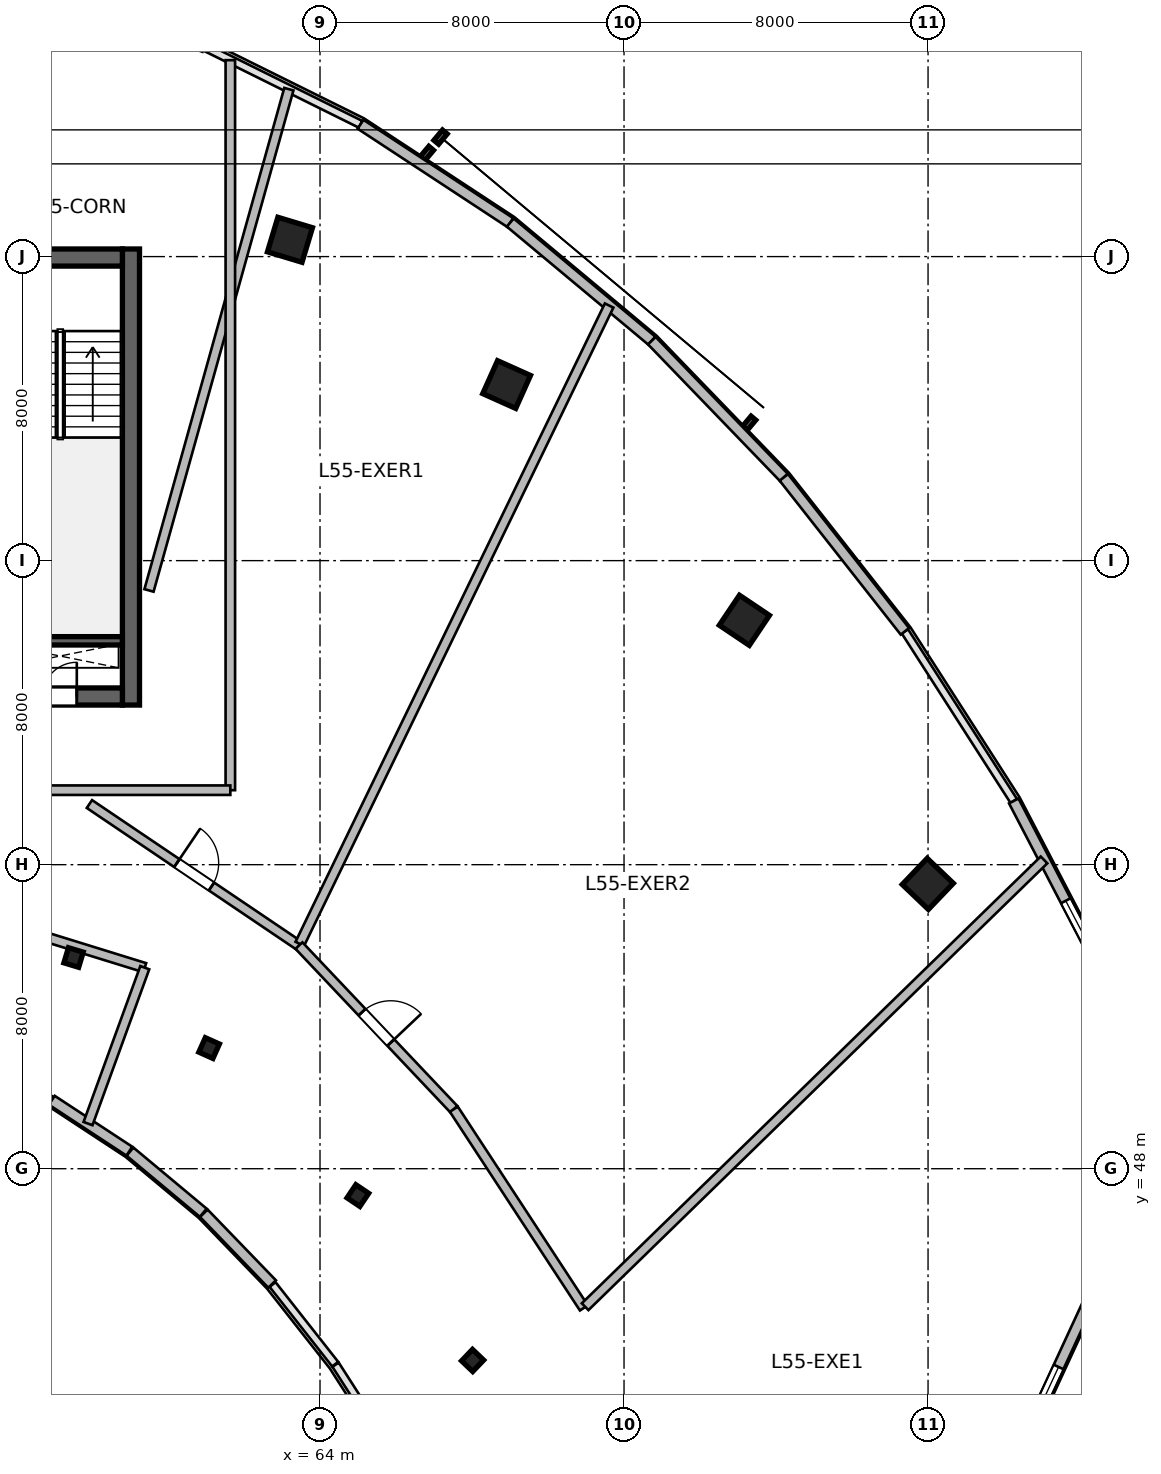
"""IFC4 building model, lengths in metres.
Left out: names, types, materials, properties, quantities, classifications, styles, units other than length and angle.
Written with IfcOpenShell. Run it as: python <this file> out.ifc"""

import sys

from ifc_helpers import new_model, si_unit, direction, frame, frame_2d, origin, origin_2d, place, context, subcontext, project, spatial, rectangle, i_section, extrude, source, transform, mapped, element, fill, save


model = new_model("IFC4")
c1 = context("Model", 3, precision=1e-05, world=origin(), true_north=direction((0.0, 1.0)))
c2 = subcontext(c1, "Body", "Model", "MODEL_VIEW")
j1 = project(units=[si_unit("LENGTHUNIT", "METRE"), si_unit("PLANEANGLEUNIT", "RADIAN")], contexts=[c1])
p1 = place(None, origin())
s1 = spatial("IfcSite", under=j1, at=p1, CompositionType="ELEMENT")
p2 = place(p1, origin())
s2 = spatial("IfcBuilding", under=s1, at=p2, CompositionType="ELEMENT")
p3 = place(p2, frame((0.0, 0.0, 227.4)))
s3 = spatial("IfcBuildingStorey", under=s2, at=p3, CompositionType="ELEMENT", Elevation=227.4)
m1 = source(origin(), c2, "Body", "SweptSolid", [
    extrude(rectangle(XDim=12.0, YDim=0.45, at=frame_2d((6.0, 0.0))), origin(), (0.0, 0.0, 1.0), 3.9),
])
p4 = place(p3, frame((59.025, 60.2, 0.0), z_axis=(0.0, 0.0, 1.0), x_axis=(0.0, 1.0, 0.0)))
e1 = element("IfcWall", 1, at=p4, inside=s3, PredefinedType="SHEAR", context=c2, shape_type="MappedRepresentation", body=[
    mapped(m1, transform((0.0, 0.0, 0.0), scale=1.0)),
])
m2 = source(origin(), c2, "Body", "SweptSolid", [
    extrude(rectangle(XDim=21.6, YDim=0.45, at=frame_2d((10.8, 0.0))), origin(), (0.0, 0.0, 1.0), 3.9),
])
p5 = place(p3, frame((37.2, 60.425, 0.0), z_axis=(0.0, 0.0, 1.0), x_axis=(1.0, 0.0, 0.0)))
e2 = element("IfcWall", 2, at=p5, inside=s3, PredefinedType="SHEAR", context=c2, shape_type="MappedRepresentation", body=[
    mapped(m2, transform((0.0, 0.0, 0.0), scale=1.0)),
])
p6 = place(p5, frame((1.1, 0.0, 0.0)))
e3 = element("IfcOpeningElement", 3, at=p6, cuts=e2, PredefinedType="OPENING", context=c2, shape_type="SweptSolid", body=[
    extrude(rectangle(XDim=1.15, YDim=2.15, at=frame_2d((0.575, 1.075))), frame((0.0, 0.235, 0.0), z_axis=(0.0, -1.0, 0.0), x_axis=(1.0, 0.0, 0.0)), (0.0, 0.0, 1.0), 0.47),
])
p7 = place(p5, frame((19.5, 0.0, 0.0)))
e4 = element("IfcOpeningElement", 4, at=p7, cuts=e2, PredefinedType="OPENING", context=c2, shape_type="SweptSolid", body=[
    extrude(rectangle(XDim=0.9, YDim=2.1, at=frame_2d((0.45, 1.05))), frame((0.0, 0.235, 0.0), z_axis=(0.0, -1.0, 0.0), x_axis=(1.0, 0.0, 0.0)), (0.0, 0.0, 1.0), 0.47),
])
p8 = place(p5, frame((12.02, 0.0, 0.0)))
e5 = element("IfcOpeningElement", 5, at=p8, cuts=e2, PredefinedType="OPENING", context=c2, shape_type="SweptSolid", body=[
    extrude(rectangle(XDim=1.6, YDim=2.15, at=frame_2d((0.8, 1.075))), frame((0.0, 0.235, 0.0), z_axis=(0.0, -1.0, 0.0), x_axis=(1.0, 0.0, 0.0)), (0.0, 0.0, 1.0), 0.47),
])
p9 = place(p3, frame((37.2, 71.975, 0.0), z_axis=(0.0, 0.0, 1.0), x_axis=(1.0, 0.0, 0.0)))
e6 = element("IfcWall", 6, at=p9, inside=s3, PredefinedType="SHEAR", context=c2, shape_type="MappedRepresentation", body=[
    mapped(m2, transform((0.0, 0.0, 0.0), scale=1.0)),
])
p10 = place(p9, frame((1.2, 0.0, 0.0)))
e7 = element("IfcOpeningElement", 7, at=p10, cuts=e6, PredefinedType="OPENING", context=c2, shape_type="SweptSolid", body=[
    extrude(rectangle(XDim=0.9, YDim=2.1, at=frame_2d((0.45, 1.05))), frame((0.0, 0.235, 0.0), z_axis=(0.0, -1.0, 0.0), x_axis=(1.0, 0.0, 0.0)), (0.0, 0.0, 1.0), 0.47),
])
p11 = place(p9, frame((14.7, 0.0, 0.0)))
e8 = element("IfcOpeningElement", 8, at=p11, cuts=e6, PredefinedType="OPENING", context=c2, shape_type="SweptSolid", body=[
    extrude(rectangle(XDim=1.2, YDim=2.15, at=frame_2d((0.6, 1.075))), frame((0.0, 0.235, 0.0), z_axis=(0.0, -1.0, 0.0), x_axis=(1.0, 0.0, 0.0)), (0.0, 0.0, 1.0), 0.47),
])
p12 = place(p9, frame((4.15, 0.0, 0.0)))
e9 = element("IfcOpeningElement", 9, at=p12, cuts=e6, PredefinedType="OPENING", context=c2, shape_type="SweptSolid", body=[
    extrude(rectangle(XDim=1.3, YDim=2.15, at=frame_2d((0.65, 1.075))), frame((0.0, 0.235, 0.0), z_axis=(0.0, -1.0, 0.0), x_axis=(1.0, 0.0, 0.0)), (0.0, 0.0, 1.0), 0.47),
])
p13 = place(p9, frame((7.1, 0.0, 0.0)))
e10 = element("IfcOpeningElement", 10, at=p13, cuts=e6, PredefinedType="OPENING", context=c2, shape_type="SweptSolid", body=[
    extrude(rectangle(XDim=0.9, YDim=2.1, at=frame_2d((0.45, 1.05))), frame((0.0, 0.235, 0.0), z_axis=(0.0, -1.0, 0.0), x_axis=(1.0, 0.0, 0.0)), (0.0, 0.0, 1.0), 0.47),
])
m3 = source(origin(), c2, "Body", "SweptSolid", [
    extrude(rectangle(XDim=3.27, YDim=0.22, at=frame_2d((1.635, 0.0))), origin(), (0.0, 0.0, 1.0), 3.9),
])
p14 = place(p3, frame((55.53, 61.89, 0.0), z_axis=(0.0, 0.0, 1.0), x_axis=(1.0, 0.0, 0.0)))
e11 = element("IfcWall", 11, at=p14, inside=s3, PredefinedType="SHEAR", context=c2, shape_type="MappedRepresentation", body=[
    mapped(m3, transform((0.0, 0.0, 0.0), scale=1.0)),
])
m4 = source(origin(), c2, "Body", "SweptSolid", [
    extrude(i_section(OverallWidth=0.406, OverallDepth=0.416, WebThickness=0.03, FlangeThickness=0.048, at=origin_2d()), origin(), (0.0, 0.0, 1.0), 3.9),
])
p15 = place(p3, frame((57.515, 53.558, 0.0), z_axis=(0.0, 0.0, 1.0), x_axis=(0.288697611798, 0.957420330337, 0.0)))
e12 = element("IfcColumn", 12, at=p15, inside=s3, PredefinedType="COLUMN", context=c2, shape_type="MappedRepresentation", body=[
    mapped(m4, transform((0.0, 0.0, 0.0), scale=1.0)),
])
m5 = source(origin(), c2, "Body", "SweptSolid", [
    extrude(rectangle(XDim=0.95, YDim=0.95, at=origin_2d()), origin(), (0.0, 0.0, 1.0), 3.9),
])
p16 = place(p3, frame((63.209, 72.442, 0.0), z_axis=(0.0, 0.0, 1.0), x_axis=(0.288697611798, 0.957420330337, 0.0)))
e13 = element("IfcColumn", 13, at=p16, inside=s3, PredefinedType="COLUMN", context=c2, shape_type="MappedRepresentation", body=[
    mapped(m5, transform((0.0, 0.0, 0.0), scale=1.0)),
])
p17 = place(p3, frame((61.082, 51.175, 0.0), z_axis=(0.0, 0.0, 1.0), x_axis=(0.409126902895, 0.912477494148, 0.0)))
e14 = element("IfcColumn", 14, at=p17, inside=s3, PredefinedType="COLUMN", context=c2, shape_type="MappedRepresentation", body=[
    mapped(m4, transform((0.0, 0.0, 0.0), scale=1.0)),
])
p18 = place(p3, frame((68.91, 68.633, 0.0), z_axis=(0.0, 0.0, 1.0), x_axis=(0.409126902895, 0.912477494148, 0.0)))
e15 = element("IfcColumn", 15, at=p18, inside=s3, PredefinedType="COLUMN", context=c2, shape_type="MappedRepresentation", body=[
    mapped(m5, transform((0.0, 0.0, 0.0), scale=1.0)),
])
p19 = place(p3, frame((64.996, 47.294, 0.0), z_axis=(0.0, 0.0, 1.0), x_axis=(0.55774510898, 0.830012285095, 0.0)))
e16 = element("IfcColumn", 16, at=p19, inside=s3, PredefinedType="COLUMN", context=c2, shape_type="MappedRepresentation", body=[
    mapped(m4, transform((0.0, 0.0, 0.0), scale=1.0)),
])
p20 = place(p3, frame((75.167, 62.43, 0.0), z_axis=(0.0, 0.0, 1.0), x_axis=(0.55774510898, 0.830012285095, 0.0)))
e17 = element("IfcColumn", 17, at=p20, inside=s3, PredefinedType="COLUMN", context=c2, shape_type="MappedRepresentation", body=[
    mapped(m5, transform((0.0, 0.0, 0.0), scale=1.0)),
])
p21 = place(p3, frame((68.015, 42.955, 0.0), z_axis=(0.0, 0.0, 1.0), x_axis=(0.690756218984, 0.723087716626, 0.0)))
e18 = element("IfcColumn", 18, at=p21, inside=s3, PredefinedType="COLUMN", context=c2, shape_type="MappedRepresentation", body=[
    mapped(m4, transform((0.0, 0.0, 0.0), scale=1.0)),
])
p22 = place(p3, frame((79.993, 55.494, 0.0), z_axis=(0.0, 0.0, 1.0), x_axis=(0.690756218984, 0.723087716626, 0.0)))
e19 = element("IfcColumn", 19, at=p22, inside=s3, PredefinedType="COLUMN", context=c2, shape_type="MappedRepresentation", body=[
    mapped(m5, transform((0.0, 0.0, 0.0), scale=1.0)),
])
m6 = source(origin(), c2, "Body", "SweptSolid", [
    extrude(rectangle(XDim=7.292, YDim=0.28, at=frame_2d((3.646, 0.0))), origin(), (0.0, 0.0, 1.0), 3.65),
])
p23 = place(p3, frame((85.268, 46.749, 0.0), z_axis=(0.0, 0.0, 1.0), x_axis=(-0.419642001049, -0.907689699708, 0.0)))
e20 = element("IfcWall", 20, at=p23, inside=s3, PredefinedType="SOLIDWALL", context=c2, shape_type="MappedRepresentation", body=[
    mapped(m6, transform((0.0, 0.0, 0.0), scale=1.0)),
])
p24 = place(p23, frame((4.369, 0.0, 0.95)))
e21 = element("IfcOpeningElement", 21, at=p24, cuts=e20, PredefinedType="OPENING", context=c2, shape_type="SweptSolid", body=[
    extrude(rectangle(XDim=2.2, YDim=2.1, at=frame_2d((1.1, 1.05))), frame((0.0, 0.15, 0.0), z_axis=(0.0, -1.0, 0.0), x_axis=(1.0, 0.0, 0.0)), (0.0, 0.0, 1.0), 0.3),
])
m7 = source(origin(), c2, "Body", "SweptSolid", [
    extrude(rectangle(XDim=2.588, YDim=0.28, at=frame_2d((1.294, 0.0))), origin(), (0.0, 0.0, 1.0), 3.65),
])
p25 = place(p3, frame((62.74, 44.966, 0.0), z_axis=(0.0, 0.0, 1.0), x_axis=(-0.694687114507, 0.719312041424, 0.0)))
e22 = element("IfcWall", 22, at=p25, inside=s3, PredefinedType="SOLIDWALL", context=c2, shape_type="MappedRepresentation", body=[
    mapped(m7, transform((0.0, 0.0, 0.0), scale=1.0)),
])
m8 = source(origin(), c2, "Body", "SweptSolid", [
    extrude(rectangle(XDim=2.511, YDim=0.28, at=frame_2d((1.256, 0.0))), origin(), (0.0, 0.0, 1.0), 3.65),
])
p26 = place(p3, frame((60.928, 46.841, 0.0), z_axis=(0.0, 0.0, 1.0), x_axis=(-0.767910416122, 0.640557251782, 0.0)))
e23 = element("IfcWall", 23, at=p26, inside=s3, PredefinedType="SOLIDWALL", context=c2, shape_type="MappedRepresentation", body=[
    mapped(m8, transform((0.0, 0.0, 0.0), scale=1.0)),
])
m9 = source(origin(), c2, "Body", "SweptSolid", [
    extrude(rectangle(XDim=2.44, YDim=0.28, at=frame_2d((1.22, 0.0))), origin(), (0.0, 0.0, 1.0), 3.65),
])
p27 = place(p3, frame((58.983, 48.462, 0.0), z_axis=(0.0, 0.0, 1.0), x_axis=(-0.83598480459, 0.548752591333, 0.0)))
e24 = element("IfcWall", 24, at=p27, inside=s3, PredefinedType="SOLIDWALL", context=c2, shape_type="MappedRepresentation", body=[
    mapped(m9, transform((0.0, 0.0, 0.0), scale=1.0)),
])
m10 = source(origin(), c2, "Body", "SweptSolid", [
    extrude(rectangle(XDim=4.713, YDim=0.28, at=frame_2d((2.356, 0.0))), origin(), (0.0, 0.0, 1.0), 3.65),
])
p28 = place(p3, frame((65.066, 75.482, 0.0), z_axis=(0.0, 0.0, 1.0), x_axis=(0.835974386457, -0.548768462275, 0.0)))
e25 = element("IfcWall", 25, at=p28, inside=s3, PredefinedType="SOLIDWALL", context=c2, shape_type="MappedRepresentation", body=[
    mapped(m10, transform((0.0, 0.0, 0.0), scale=1.0)),
])
m11 = source(origin(), c2, "Body", "SweptSolid", [
    extrude(rectangle(XDim=4.852, YDim=0.28, at=frame_2d((2.426, 0.0))), origin(), (0.0, 0.0, 1.0), 3.65),
])
p29 = place(p3, frame((69.006, 72.896, 0.0), z_axis=(0.0, 0.0, 1.0), x_axis=(0.767936605821, -0.640525853843, 0.0)))
e26 = element("IfcWall", 26, at=p29, inside=s3, PredefinedType="SOLIDWALL", context=c2, shape_type="MappedRepresentation", body=[
    mapped(m11, transform((0.0, 0.0, 0.0), scale=1.0)),
])
m12 = source(origin(), c2, "Body", "SweptSolid", [
    extrude(rectangle(XDim=5.001, YDim=0.28, at=frame_2d((2.5, 0.0))), origin(), (0.0, 0.0, 1.0), 3.65),
])
p30 = place(p3, frame((72.732, 69.788, 0.0), z_axis=(0.0, 0.0, 1.0), x_axis=(0.694572731818, -0.719422490762, 0.0)))
e27 = element("IfcWall", 27, at=p30, inside=s3, PredefinedType="SOLIDWALL", context=c2, shape_type="MappedRepresentation", body=[
    mapped(m12, transform((0.0, 0.0, 0.0), scale=1.0)),
])
m13 = source(origin(), c2, "Body", "SweptSolid", [
    extrude(rectangle(XDim=5.153, YDim=0.28, at=frame_2d((2.577, 0.0))), origin(), (0.0, 0.0, 1.0), 3.65),
])
p31 = place(p3, frame((76.205, 66.19, 0.0), z_axis=(0.0, 0.0, 1.0), x_axis=(0.618179283891, -0.786037132054, 0.0)))
e28 = element("IfcWall", 28, at=p31, inside=s3, PredefinedType="SOLIDWALL", context=c2, shape_type="MappedRepresentation", body=[
    mapped(m13, transform((0.0, 0.0, 0.0), scale=1.0)),
])
m14 = source(origin(), c2, "Body", "SweptSolid", [
    extrude(rectangle(XDim=5.416, YDim=0.28, at=frame_2d((2.708, 0.0))), origin(), (0.0, 0.0, 1.0), 3.65),
])
p32 = place(p3, frame((82.255, 57.677, 0.0), z_axis=(0.0, 0.0, 1.0), x_axis=(0.46177852435, -0.886995261796, 0.0)))
e29 = element("IfcWall", 29, at=p32, inside=s3, PredefinedType="SOLIDWALL", context=c2, shape_type="MappedRepresentation", body=[
    mapped(m14, transform((0.0, 0.0, 0.0), scale=1.0)),
])
p33 = place(p32, frame((2.962, 0.0, 0.95)))
e30 = element("IfcOpeningElement", 30, at=p33, cuts=e29, PredefinedType="OPENING", context=c2, shape_type="SweptSolid", body=[
    extrude(rectangle(XDim=2.2, YDim=2.1, at=frame_2d((1.1, 1.05))), frame((0.0, 0.15, 0.0), z_axis=(0.0, -1.0, 0.0), x_axis=(1.0, 0.0, 0.0)), (0.0, 0.0, 1.0), 0.3),
])
m15 = source(origin(), c2, "Body", "SweptSolid", [
    extrude(rectangle(XDim=11.921, YDim=0.25, at=frame_2d((5.961, 0.0))), origin(), (0.0, 0.0, 1.0), 3.095),
])
p34 = place(p3, frame((48.0, 56.813, 0.0), z_axis=(0.0, 0.0, 1.0), x_axis=(0.955326235971, -0.295553350287, 0.0)))
e31 = element("IfcWall", 31, at=p34, inside=s3, PredefinedType="PARTITIONING", context=c2, shape_type="MappedRepresentation", body=[
    mapped(m15, transform((0.0, 0.0, 0.0), scale=1.0)),
])
p35 = place(p34, frame((5.611, 0.0, 0.0)))
e32 = element("IfcOpeningElement", 32, at=p35, cuts=e31, PredefinedType="OPENING", context=c2, shape_type="SweptSolid", body=[
    extrude(rectangle(XDim=1.1, YDim=2.15, at=frame_2d((0.55, 1.075))), frame((0.0, 0.135, 0.0), z_axis=(0.0, -1.0, 0.0), x_axis=(1.0, 0.0, 0.0)), (0.0, 0.0, 1.0), 0.27),
])
m16 = source(origin(), c2, "Body", "SweptSolid", [
    extrude(rectangle(XDim=4.366, YDim=0.25, at=frame_2d((2.183, 0.0))), origin(), (0.0, 0.0, 1.0), 3.65),
])
p36 = place(p3, frame((57.896, 49.187, 0.0), z_axis=(0.0, 0.0, 1.0), x_axis=(0.342061827486, 0.939677447945, 0.0)))
e33 = element("IfcWall", 33, at=p36, inside=s3, PredefinedType="PARTITIONING", context=c2, shape_type="MappedRepresentation", body=[
    mapped(m16, transform((0.0, 0.0, 0.0), scale=1.0)),
])
m17 = source(origin(), c2, "Body", "SweptSolid", [
    extrude(rectangle(XDim=6.654, YDim=0.25, at=frame_2d((3.327, 0.0))), origin(), (0.0, 0.0, 1.0), 3.217),
])
p37 = place(p3, frame((57.932, 57.596, 0.0), z_axis=(0.0, 0.0, 1.0), x_axis=(0.828704875625, -0.559685830726, 0.0)))
e34 = element("IfcWall", 34, at=p37, inside=s3, PredefinedType="PARTITIONING", context=c2, shape_type="MappedRepresentation", body=[
    mapped(m17, transform((0.0, 0.0, 0.0), scale=1.0)),
])
p38 = place(p37, frame((2.777, 0.0, 0.0)))
e35 = element("IfcOpeningElement", 35, at=p38, cuts=e34, PredefinedType="OPENING", context=c2, shape_type="SweptSolid", body=[
    extrude(rectangle(XDim=1.1, YDim=2.15, at=frame_2d((0.55, 1.075))), frame((0.0, 0.135, 0.0), z_axis=(0.0, -1.0, 0.0), x_axis=(1.0, 0.0, 0.0)), (0.0, 0.0, 1.0), 0.27),
])
m18 = source(origin(), c2, "Body", "SweptSolid", [
    extrude(rectangle(XDim=13.694, YDim=0.25, at=frame_2d((6.847, 0.0))), origin(), (0.0, 0.0, 1.0), 3.65),
])
p39 = place(p3, frame((59.5, 63.216, 0.0), z_axis=(0.0, 0.0, 1.0), x_axis=(0.268753576604, 0.963208967495, 0.0)))
e36 = element("IfcWall", 36, at=p39, inside=s3, PredefinedType="PARTITIONING", context=c2, shape_type="MappedRepresentation", body=[
    mapped(m18, transform((0.0, 0.0, 0.0), scale=1.0)),
])
m19 = source(origin(), c2, "Body", "SweptSolid", [
    extrude(rectangle(XDim=18.664, YDim=0.25, at=frame_2d((9.332, 0.0))), origin(), (0.0, 0.0, 1.0), 3.65),
])
p40 = place(p3, frame((63.468, 53.917, 0.0), z_axis=(0.0, 0.0, 1.0), x_axis=(0.43611848828, 0.899889251064, 0.0)))
e37 = element("IfcWall", 37, at=p40, inside=s3, PredefinedType="PARTITIONING", context=c2, shape_type="MappedRepresentation", body=[
    mapped(m19, transform((0.0, 0.0, 0.0), scale=1.0)),
])
m20 = source(origin(), c2, "Body", "SweptSolid", [
    extrude(rectangle(XDim=5.929, YDim=0.25, at=frame_2d((2.964, 0.0))), origin(), (0.0, 0.0, 1.0), 3.65),
])
p41 = place(p3, frame((63.446, 53.872, 0.0), z_axis=(0.0, 0.0, 1.0), x_axis=(0.687445334019, -0.726236127396, 0.0)))
e38 = element("IfcWall", 38, at=p41, inside=s3, PredefinedType="PARTITIONING", context=c2, shape_type="MappedRepresentation", body=[
    mapped(m20, transform((0.0, 0.0, 0.0), scale=1.0)),
])
p42 = place(p41, frame((2.414, 0.0, 0.0)))
e39 = element("IfcOpeningElement", 39, at=p42, cuts=e38, PredefinedType="OPENING", context=c2, shape_type="SweptSolid", body=[
    extrude(rectangle(XDim=1.1, YDim=2.15, at=frame_2d((0.55, 1.075))), frame((0.0, 0.135, 0.0), z_axis=(0.0, -1.0, 0.0), x_axis=(1.0, 0.0, 0.0)), (0.0, 0.0, 1.0), 0.27),
])
m21 = source(origin(), c2, "Body", "SweptSolid", [
    extrude(rectangle(XDim=6.249, YDim=0.25, at=frame_2d((3.125, 0.0))), origin(), (0.0, 0.0, 1.0), 3.217),
])
p43 = place(p3, frame((67.522, 49.566, 0.0), z_axis=(0.0, 0.0, 1.0), x_axis=(0.547611432082, -0.836732764659, 0.0)))
e40 = element("IfcWall", 40, at=p43, inside=s3, PredefinedType="PARTITIONING", context=c2, shape_type="MappedRepresentation", body=[
    mapped(m21, transform((0.0, 0.0, 0.0), scale=1.0)),
])
m22 = source(origin(), c2, "Body", "SweptSolid", [
    extrude(rectangle(XDim=16.854, YDim=0.25, at=frame_2d((8.427, 0.0))), origin(), (0.0, 0.0, 1.0), 3.65),
])
p44 = place(p3, frame((70.976, 44.369, 0.0), z_axis=(0.0, 0.0, 1.0), x_axis=(0.716517105841, 0.697569521294, 0.0)))
e41 = element("IfcWall", 41, at=p44, inside=s3, PredefinedType="PARTITIONING", context=c2, shape_type="MappedRepresentation", body=[
    mapped(m22, transform((0.0, 0.0, 0.0), scale=1.0)),
])
m23 = source(origin(), c2, "Body", "SweptSolid", [
    extrude(rectangle(XDim=19.209, YDim=0.25, at=frame_2d((9.604, 0.0))), origin(), (0.0, 0.0, 1.0), 3.65),
])
p45 = place(p3, frame((61.64, 57.96, 0.0), z_axis=(0.0, 0.0, 1.0), x_axis=(0.0, 1.0, 0.0)))
e42 = element("IfcWall", 42, at=p45, inside=s3, PredefinedType="PARTITIONING", context=c2, shape_type="MappedRepresentation", body=[
    mapped(m23, transform((0.0, 0.0, 0.0), scale=1.0)),
])
m24 = source(origin(), c2, "Body", "SweptSolid", [
    extrude(rectangle(XDim=12.39, YDim=0.25, at=frame_2d((6.195, 0.0))), origin(), (0.0, 0.0, 1.0), 3.217),
])
p46 = place(p3, frame((49.25, 57.96, 0.0), z_axis=(0.0, 0.0, 1.0), x_axis=(1.0, 0.0, 0.0)))
e43 = element("IfcWall", 43, at=p46, inside=s3, PredefinedType="PARTITIONING", context=c2, shape_type="MappedRepresentation", body=[
    mapped(m24, transform((0.0, 0.0, 0.0), scale=1.0)),
])
m25 = source(origin(), c2, "Body", "SweptSolid", [
    extrude(rectangle(XDim=2.2, YDim=2.1, at=frame_2d((1.1, 1.05))), frame((0.0, 0.03, 0.0), z_axis=(0.0, -1.0, 0.0), x_axis=(1.0, 0.0, 0.0)), (0.0, 0.0, 1.0), 0.06),
])
p47 = place(p24, origin())
e44 = element("IfcWindow", 44, at=p47, inside=s3, PartitioningType="TRIPLE_PANEL_VERTICAL", PredefinedType="WINDOW", context=c2, shape_type="MappedRepresentation", body=[
    mapped(m25, transform((0.0, 0.0, 0.0), scale=1.0)),
])
fill(e21, e44)
p48 = place(p33, origin())
e45 = element("IfcWindow", 45, at=p48, inside=s3, PartitioningType="TRIPLE_PANEL_VERTICAL", PredefinedType="WINDOW", context=c2, shape_type="MappedRepresentation", body=[
    mapped(m25, transform((0.0, 0.0, 0.0), scale=1.0)),
])
fill(e30, e45)
m26 = source(origin(), c2, "Body", "SweptSolid", [
    extrude(rectangle(XDim=0.9, YDim=2.1, at=frame_2d((0.45, 1.05))), frame((0.0, 0.025, 0.0), z_axis=(0.0, -1.0, 0.0), x_axis=(1.0, 0.0, 0.0)), (0.0, 0.0, 1.0), 0.05),
])
p49 = place(p7, origin())
e46 = element("IfcDoor", 46, at=p49, inside=s3, OperationType="SINGLE_SWING_RIGHT", PredefinedType="DOOR", context=c2, shape_type="MappedRepresentation", body=[
    mapped(m26, transform((0.0, 0.0, 0.0), scale=1.0)),
])
fill(e4, e46)
m27 = source(origin(), c2, "Body", "SweptSolid", [
    extrude(rectangle(XDim=1.1, YDim=2.15, at=frame_2d((0.55, 1.075))), frame((0.0, 0.025, 0.0), z_axis=(0.0, -1.0, 0.0), x_axis=(1.0, 0.0, 0.0)), (0.0, 0.0, 1.0), 0.05),
])
p50 = place(p38, origin())
e47 = element("IfcDoor", 47, at=p50, inside=s3, OperationType="SINGLE_SWING_LEFT", PredefinedType="DOOR", context=c2, shape_type="MappedRepresentation", body=[
    mapped(m27, transform((0.0, 0.0, 0.0), scale=1.0)),
])
fill(e35, e47)
p51 = place(p42, origin())
e48 = element("IfcDoor", 48, at=p51, inside=s3, OperationType="SINGLE_SWING_RIGHT", PredefinedType="DOOR", context=c2, shape_type="MappedRepresentation", body=[
    mapped(m27, transform((0.0, 0.0, 0.0), scale=1.0)),
])
fill(e39, e48)
save(model, sys.argv[1])
